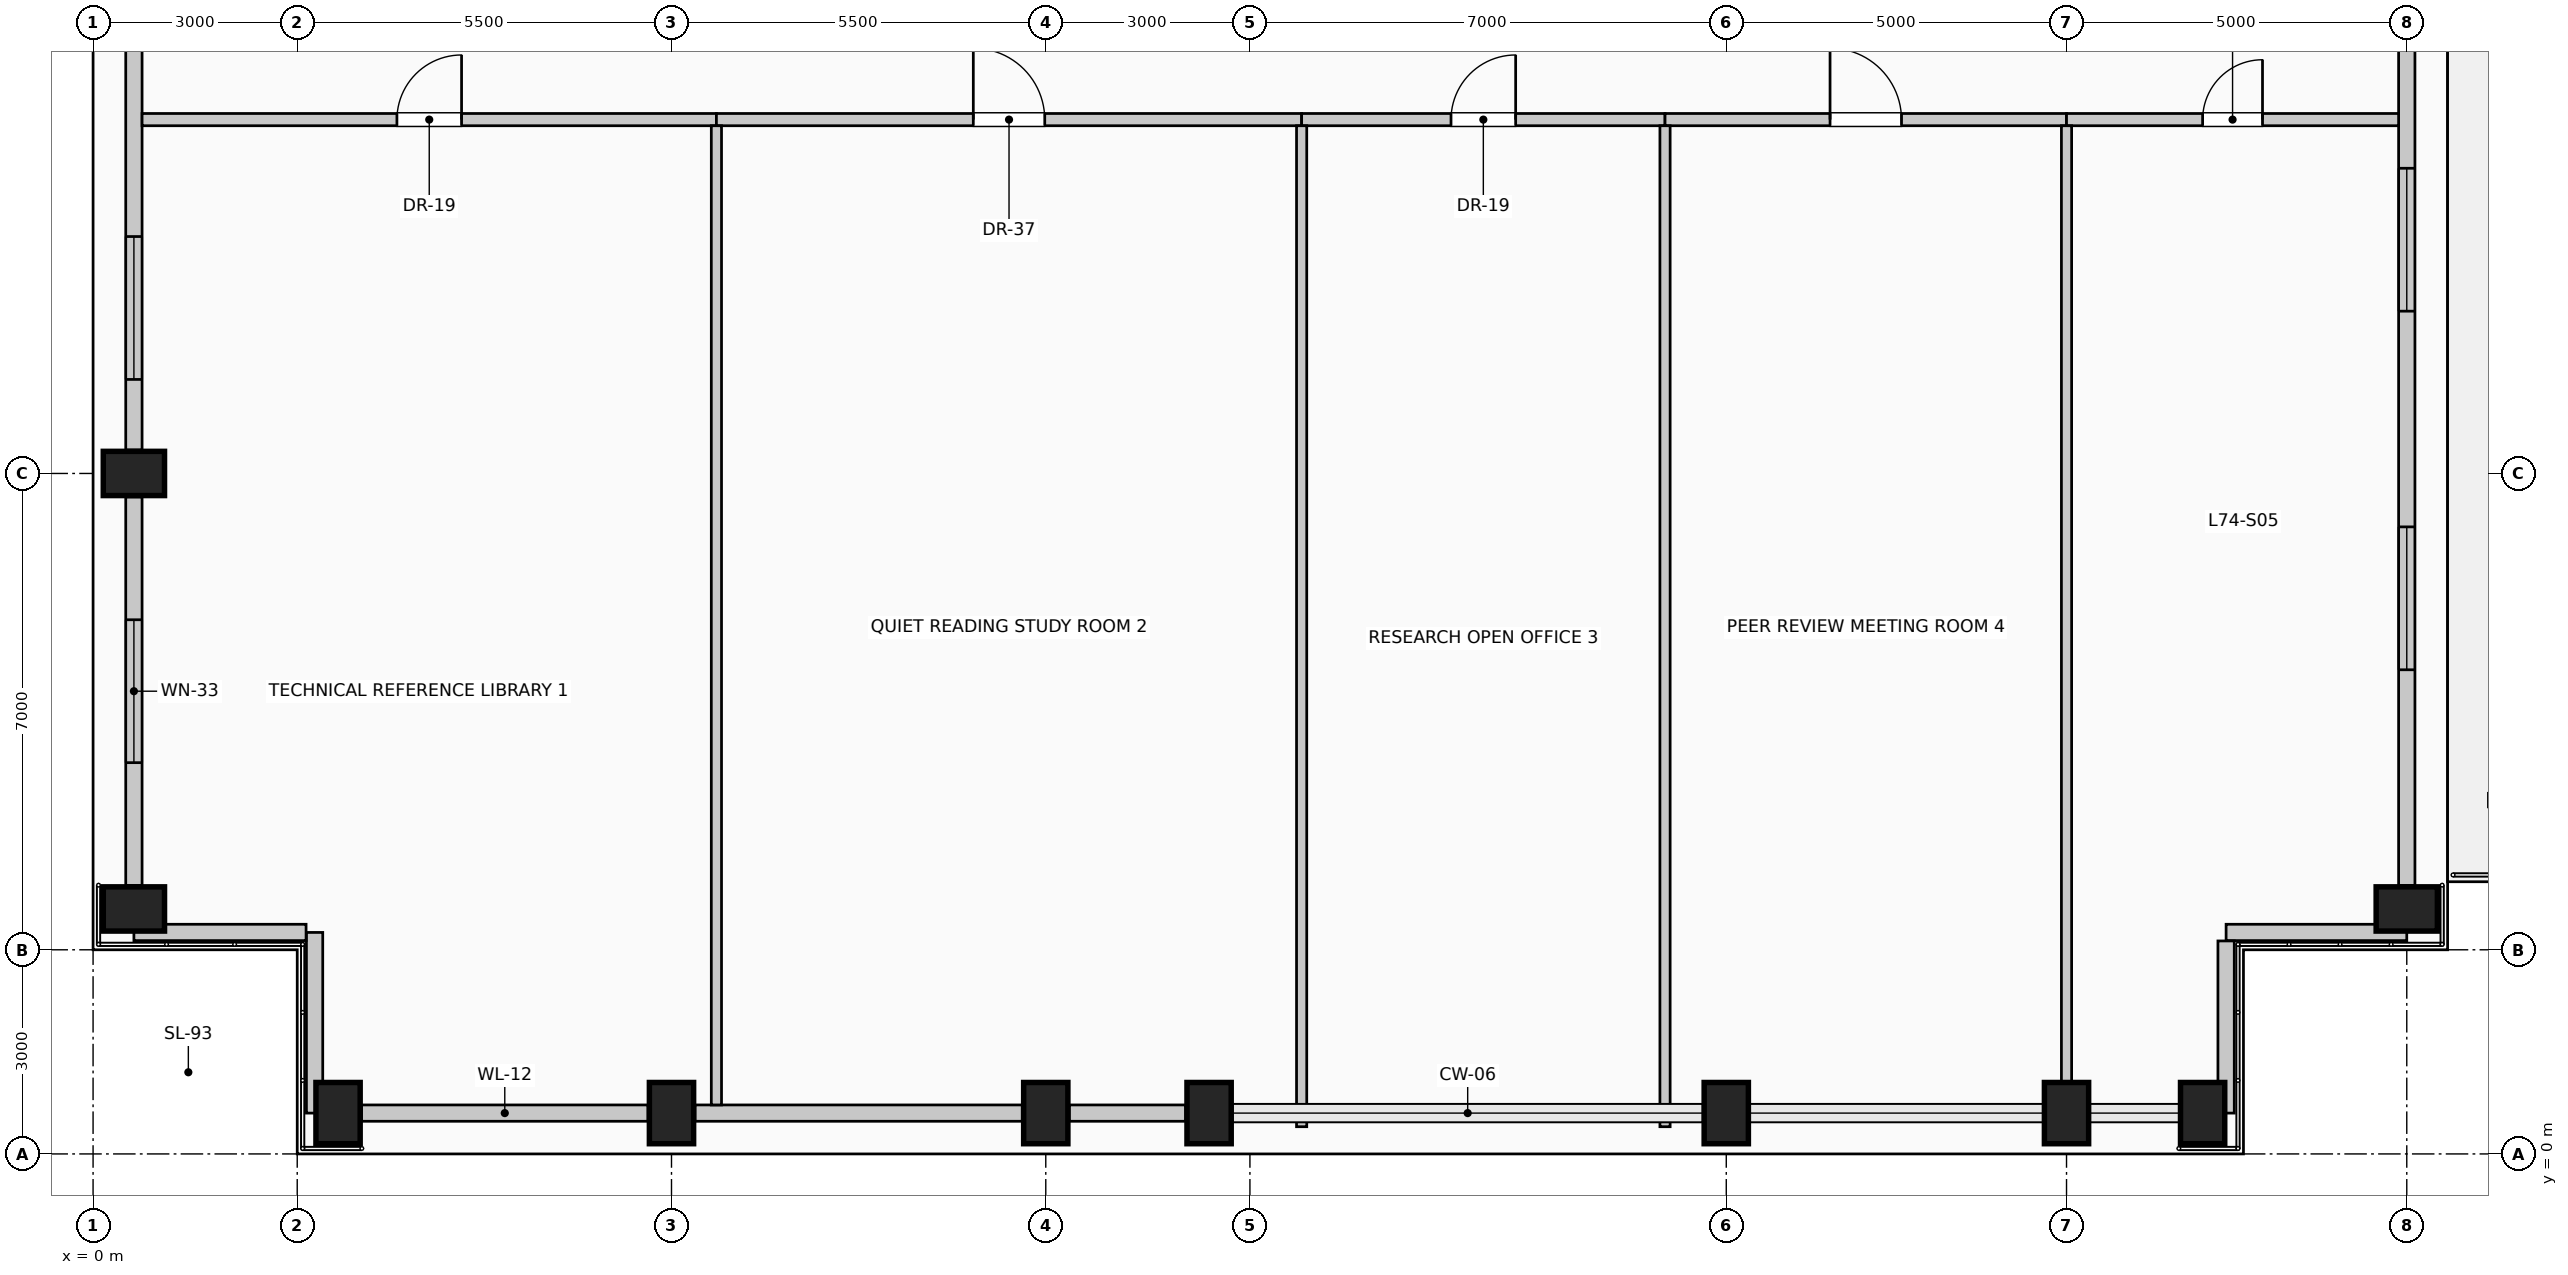
"""IFC4 building model, lengths in metres.
Left out: names, types, materials, properties, quantities, classifications, styles, units other than length and angle.
Written with IfcOpenShell. Run it as: python <this file> out.ifc"""

import sys

from ifc_helpers import new_model, si_unit, direction, frame, frame_2d, origin, origin_2d, place, context, subcontext, project, spatial, rectangle, extrude, element, fill, save


model = new_model("IFC4")
c1 = context("Model", 3, precision=1e-05, world=origin(), true_north=direction((0.0, 1.0)))
c2 = subcontext(c1, "Body", "Model", "MODEL_VIEW")
j1 = project(units=[si_unit("LENGTHUNIT", "METRE"), si_unit("PLANEANGLEUNIT", "RADIAN")], contexts=[c1])
p1 = place(None, origin())
s1 = spatial("IfcSite", under=j1, at=p1, CompositionType="ELEMENT")
p2 = place(p1, origin())
s2 = spatial("IfcBuilding", under=s1, at=p2, CompositionType="ELEMENT")
p3 = place(p2, frame((0.0, 0.0, 305.0)))
s3 = spatial("IfcBuildingStorey", under=s2, at=p3, CompositionType="ELEMENT", Elevation=305.0)
for number, where, z_axis, x_axis in (
    (1, (3.6, 0.6, 0.0), (0.0, 0.0, 1.0), (1.0, 0.0, 0.0)),
    (2, (8.5, 0.6, 0.0), (0.0, 0.0, 1.0), (1.0, 0.0, 0.0)),
    (3, (14.0, 0.6, 0.0), (0.0, 0.0, 1.0), (1.0, 0.0, 0.0)),
    (4, (16.4, 0.6, 0.0), (0.0, 0.0, 1.0), (1.0, 0.0, 0.0)),
    (5, (24.0, 0.6, 0.0), (0.0, 0.0, 1.0), (1.0, 0.0, 0.0)),
    (6, (29.0, 0.6, 0.0), (0.0, 0.0, 1.0), (1.0, 0.0, 0.0)),
    (7, (31.0, 0.6, 0.0), (0.0, 0.0, 1.0), (1.0, 0.0, 0.0)),
    (8, (0.6, 3.6, 0.0), (0.0, 0.0, 1.0), (0.0, 1.0, 0.0)),
    (9, (34.0, 3.6, 0.0), (0.0, 0.0, 1.0), (0.0, 1.0, 0.0)),
    (10, (0.6, 10.0, 0.0), (0.0, 0.0, 1.0), (0.0, 1.0, 0.0)),
):
    element("IfcColumn", number, at=place(p3, frame(where, z_axis=z_axis, x_axis=x_axis)), inside=s3, PredefinedType="COLUMN", context=c2, shape_type="SweptSolid", body=[
        extrude(rectangle(XDim=0.65, YDim=0.9, at=origin_2d()), origin(), (0.0, 0.0, 1.0), 4.0),
    ])
p4 = place(p3, frame((8.155, 0.6, 0.0), z_axis=(0.0, 0.0, 1.0), x_axis=(-1.0, 0.0, 0.0)))
e11 = element("IfcWall", 11, at=p4, inside=s3, PredefinedType="SOLIDWALL", context=c2, shape_type="SweptSolid", body=[
    extrude(rectangle(XDim=4.21, YDim=0.24, at=frame_2d((2.105, 0.0))), origin(), (0.0, 0.0, 1.0), 3.025),
])
p5 = place(p3, frame((13.655, 0.6, 0.0), z_axis=(0.0, 0.0, 1.0), x_axis=(-1.0, 0.0, 0.0)))
e12 = element("IfcWall", 12, at=p5, inside=s3, PredefinedType="SOLIDWALL", context=c2, shape_type="SweptSolid", body=[
    extrude(rectangle(XDim=4.81, YDim=0.24, at=frame_2d((2.405, 0.0))), origin(), (0.0, 0.0, 1.0), 3.025),
])
p6 = place(p3, frame((16.055, 0.6, 0.0), z_axis=(0.0, 0.0, 1.0), x_axis=(-1.0, 0.0, 0.0)))
e13 = element("IfcWall", 13, at=p6, inside=s3, PredefinedType="SOLIDWALL", context=c2, shape_type="SweptSolid", body=[
    extrude(rectangle(XDim=1.71, YDim=0.24, at=frame_2d((0.855, 0.0))), origin(), (0.0, 0.0, 1.0), 3.025),
])
p7 = place(p3, frame((0.6, 3.945, 0.0), z_axis=(0.0, 0.0, 1.0), x_axis=(0.0, 1.0, 0.0)))
e14 = element("IfcWall", 14, at=p7, inside=s3, PredefinedType="SOLIDWALL", context=c2, shape_type="SweptSolid", body=[
    extrude(rectangle(XDim=5.71, YDim=0.24, at=frame_2d((2.855, 0.0))), origin(), (0.0, 0.0, 1.0), 3.025),
])
p8 = place(p7, frame((1.805, 0.0, 0.35)))
e15 = element("IfcOpeningElement", 15, at=p8, cuts=e14, PredefinedType="OPENING", context=c2, shape_type="SweptSolid", body=[
    extrude(rectangle(XDim=2.1, YDim=2.2, at=frame_2d((1.05, 1.1))), frame((0.0, 0.13, 0.0), z_axis=(0.0, -1.0, 0.0), x_axis=(1.0, 0.0, 0.0)), (0.0, 0.0, 1.0), 0.26),
])
p9 = place(p3, frame((0.6, 10.345, 0.0), z_axis=(0.0, 0.0, 1.0), x_axis=(0.0, 1.0, 0.0)))
e16 = element("IfcWall", 16, at=p9, inside=s3, PredefinedType="SOLIDWALL", context=c2, shape_type="SweptSolid", body=[
    extrude(rectangle(XDim=7.31, YDim=0.24, at=frame_2d((3.655, 0.0))), origin(), (0.0, 0.0, 1.0), 3.025),
])
p10 = place(p9, frame((1.037, 0.0, 0.35)))
e17 = element("IfcOpeningElement", 17, at=p10, cuts=e16, PredefinedType="OPENING", context=c2, shape_type="SweptSolid", body=[
    extrude(rectangle(XDim=2.1, YDim=2.2, at=frame_2d((1.05, 1.1))), frame((0.0, 0.13, 0.0), z_axis=(0.0, -1.0, 0.0), x_axis=(1.0, 0.0, 0.0)), (0.0, 0.0, 1.0), 0.26),
])
p11 = place(p3, frame((34.0, 17.655, 0.0), z_axis=(0.0, 0.0, 1.0), x_axis=(0.0, -1.0, 0.0)))
e18 = element("IfcWall", 18, at=p11, inside=s3, PredefinedType="SOLIDWALL", context=c2, shape_type="SweptSolid", body=[
    extrude(rectangle(XDim=13.71, YDim=0.24, at=frame_2d((6.855, 0.0))), origin(), (0.0, 0.0, 1.0), 3.025),
])
p12 = place(p11, frame((3.17, 0.0, 0.35)))
e19 = element("IfcOpeningElement", 19, at=p12, cuts=e18, PredefinedType="OPENING", context=c2, shape_type="SweptSolid", body=[
    extrude(rectangle(XDim=2.1, YDim=2.2, at=frame_2d((1.05, 1.1))), frame((0.0, 0.13, 0.0), z_axis=(0.0, -1.0, 0.0), x_axis=(1.0, 0.0, 0.0)), (0.0, 0.0, 1.0), 0.26),
])
p13 = place(p11, frame((8.44, 0.0, 0.35)))
e20 = element("IfcOpeningElement", 20, at=p13, cuts=e18, PredefinedType="OPENING", context=c2, shape_type="SweptSolid", body=[
    extrude(rectangle(XDim=2.1, YDim=2.2, at=frame_2d((1.05, 1.1))), frame((0.0, 0.13, 0.0), z_axis=(0.0, -1.0, 0.0), x_axis=(1.0, 0.0, 0.0)), (0.0, 0.0, 1.0), 0.26),
])
p14 = place(p3, frame((34.0, 3.255, 0.0), z_axis=(0.0, 0.0, 1.0), x_axis=(-1.0, 0.0, 0.0)))
e21 = element("IfcWall", 21, at=p14, inside=s3, PredefinedType="SOLIDWALL", context=c2, shape_type="SweptSolid", body=[
    extrude(rectangle(XDim=2.655, YDim=0.24, at=frame_2d((1.328, 0.0))), origin(), (0.0, 0.0, 1.0), 3.775),
])
p15 = place(p3, frame((31.345, 3.13, 0.0), z_axis=(0.0, 0.0, 1.0), x_axis=(0.0, -1.0, 0.0)))
e22 = element("IfcWall", 22, at=p15, inside=s3, PredefinedType="SOLIDWALL", context=c2, shape_type="SweptSolid", body=[
    extrude(rectangle(XDim=2.53, YDim=0.24, at=frame_2d((1.265, 0.0))), origin(), (0.0, 0.0, 1.0), 3.775),
])
p16 = place(p3, frame((3.255, 0.6, 0.0), z_axis=(0.0, 0.0, 1.0), x_axis=(0.0, 1.0, 0.0)))
e23 = element("IfcWall", 23, at=p16, inside=s3, PredefinedType="SOLIDWALL", context=c2, shape_type="SweptSolid", body=[
    extrude(rectangle(XDim=2.655, YDim=0.24, at=frame_2d((1.327, 0.0))), origin(), (0.0, 0.0, 1.0), 3.775),
])
p17 = place(p3, frame((3.13, 3.255, 0.0), z_axis=(0.0, 0.0, 1.0), x_axis=(-1.0, 0.0, 0.0)))
e24 = element("IfcWall", 24, at=p17, inside=s3, PredefinedType="SOLIDWALL", context=c2, shape_type="SweptSolid", body=[
    extrude(rectangle(XDim=2.53, YDim=0.24, at=frame_2d((1.265, 0.0))), origin(), (0.0, 0.0, 1.0), 3.775),
])
p18 = place(p3, frame((0.72, 15.2, 0.0), z_axis=(0.0, 0.0, 1.0), x_axis=(1.0, 0.0, 0.0)))
e25 = element("IfcWall", 25, at=p18, inside=s3, PredefinedType="PARTITIONING", context=c2, shape_type="SweptSolid", body=[
    extrude(rectangle(XDim=8.44, YDim=0.18, at=frame_2d((4.22, 0.0))), origin(), (0.0, 0.0, 1.0), 3.775),
])
p19 = place(p18, frame((3.745, 0.0, 0.0)))
e26 = element("IfcOpeningElement", 26, at=p19, cuts=e25, PredefinedType="OPENING", context=c2, shape_type="SweptSolid", body=[
    extrude(rectangle(XDim=0.95, YDim=2.15, at=frame_2d((0.475, 1.075))), frame((0.0, 0.1, 0.0), z_axis=(0.0, -1.0, 0.0), x_axis=(1.0, 0.0, 0.0)), (0.0, 0.0, 1.0), 0.2),
])
p20 = place(p3, frame((9.16, 15.2, 0.0), z_axis=(0.0, 0.0, 1.0), x_axis=(1.0, 0.0, 0.0)))
e27 = element("IfcWall", 27, at=p20, inside=s3, PredefinedType="PARTITIONING", context=c2, shape_type="SweptSolid", body=[
    extrude(rectangle(XDim=8.6, YDim=0.18, at=frame_2d((4.3, 0.0))), origin(), (0.0, 0.0, 1.0), 3.775),
])
p21 = place(p20, frame((3.775, 0.0, 0.0)))
e28 = element("IfcOpeningElement", 28, at=p21, cuts=e27, PredefinedType="OPENING", context=c2, shape_type="SweptSolid", body=[
    extrude(rectangle(XDim=1.05, YDim=2.15, at=frame_2d((0.525, 1.075))), frame((0.0, 0.1, 0.0), z_axis=(0.0, -1.0, 0.0), x_axis=(1.0, 0.0, 0.0)), (0.0, 0.0, 1.0), 0.2),
])
p22 = place(p3, frame((17.76, 15.2, 0.0), z_axis=(0.0, 0.0, 1.0), x_axis=(1.0, 0.0, 0.0)))
e29 = element("IfcWall", 29, at=p22, inside=s3, PredefinedType="PARTITIONING", context=c2, shape_type="SweptSolid", body=[
    extrude(rectangle(XDim=5.34, YDim=0.18, at=frame_2d((2.67, 0.0))), origin(), (0.0, 0.0, 1.0), 3.775),
])
p23 = place(p22, frame((2.195, 0.0, 0.0)))
e30 = element("IfcOpeningElement", 30, at=p23, cuts=e29, PredefinedType="OPENING", context=c2, shape_type="SweptSolid", body=[
    extrude(rectangle(XDim=0.95, YDim=2.15, at=frame_2d((0.475, 1.075))), frame((0.0, 0.1, 0.0), z_axis=(0.0, -1.0, 0.0), x_axis=(1.0, 0.0, 0.0)), (0.0, 0.0, 1.0), 0.2),
])
p24 = place(p3, frame((23.1, 15.2, 0.0), z_axis=(0.0, 0.0, 1.0), x_axis=(1.0, 0.0, 0.0)))
e31 = element("IfcWall", 31, at=p24, inside=s3, PredefinedType="PARTITIONING", context=c2, shape_type="SweptSolid", body=[
    extrude(rectangle(XDim=5.9, YDim=0.18, at=frame_2d((2.95, 0.0))), origin(), (0.0, 0.0, 1.0), 3.775),
])
p25 = place(p24, frame((2.425, 0.0, 0.0)))
e32 = element("IfcOpeningElement", 32, at=p25, cuts=e31, PredefinedType="OPENING", context=c2, shape_type="SweptSolid", body=[
    extrude(rectangle(XDim=1.05, YDim=2.15, at=frame_2d((0.525, 1.075))), frame((0.0, 0.1, 0.0), z_axis=(0.0, -1.0, 0.0), x_axis=(1.0, 0.0, 0.0)), (0.0, 0.0, 1.0), 0.2),
])
p26 = place(p3, frame((29.0, 15.2, 0.0), z_axis=(0.0, 0.0, 1.0), x_axis=(1.0, 0.0, 0.0)))
e33 = element("IfcWall", 33, at=p26, inside=s3, PredefinedType="PARTITIONING", context=c2, shape_type="SweptSolid", body=[
    extrude(rectangle(XDim=4.88, YDim=0.18, at=frame_2d((2.44, 0.0))), origin(), (0.0, 0.0, 1.0), 3.775),
])
p27 = place(p26, frame((2.0, 0.0, 0.0)))
e34 = element("IfcOpeningElement", 34, at=p27, cuts=e33, PredefinedType="OPENING", context=c2, shape_type="SweptSolid", body=[
    extrude(rectangle(XDim=0.88, YDim=2.1, at=frame_2d((0.44, 1.05))), frame((0.0, 0.1, 0.0), z_axis=(0.0, -1.0, 0.0), x_axis=(1.0, 0.0, 0.0)), (0.0, 0.0, 1.0), 0.2),
])
p28 = place(p3, frame((9.16, 0.72, 0.0), z_axis=(0.0, 0.0, 1.0), x_axis=(0.0, 1.0, 0.0)))
e35 = element("IfcWall", 35, at=p28, inside=s3, PredefinedType="PARTITIONING", context=c2, shape_type="SweptSolid", body=[
    extrude(rectangle(XDim=14.39, YDim=0.15, at=frame_2d((7.195, 0.0))), origin(), (0.0, 0.0, 1.0), 3.775),
])
for number, where, z_axis, x_axis in (
    (36, (17.76, 0.4, 0.0), (0.0, 0.0, 1.0), (0.0, 1.0, 0.0)),
    (37, (23.1, 0.4, 0.0), (0.0, 0.0, 1.0), (0.0, 1.0, 0.0)),
):
    element("IfcWall", number, at=place(p3, frame(where, z_axis=z_axis, x_axis=x_axis)), inside=s3, PredefinedType="PARTITIONING", context=c2, shape_type="SweptSolid", body=[
        extrude(rectangle(XDim=14.71, YDim=0.15, at=frame_2d((7.355, 0.0))), origin(), (0.0, 0.0, 1.0), 3.775),
    ])
p29 = place(p3, frame((29.0, 1.05, 0.0), z_axis=(0.0, 0.0, 1.0), x_axis=(0.0, 1.0, 0.0)))
e38 = element("IfcWall", 38, at=p29, inside=s3, PredefinedType="PARTITIONING", context=c2, shape_type="SweptSolid", body=[
    extrude(rectangle(XDim=14.06, YDim=0.15, at=frame_2d((7.03, 0.0))), origin(), (0.0, 0.0, 1.0), 3.27),
])
p30 = place(p8, origin())
e39 = element("IfcWindow", 39, at=p30, inside=s3, PartitioningType="SINGLE_PANEL", PredefinedType="WINDOW", context=c2, shape_type="SweptSolid", body=[
    extrude(rectangle(XDim=2.1, YDim=2.2, at=frame_2d((1.05, 1.1))), frame((0.0, 0.03, 0.0), z_axis=(0.0, -1.0, 0.0), x_axis=(1.0, 0.0, 0.0)), (0.0, 0.0, 1.0), 0.06),
])
fill(e15, e39)
p31 = place(p10, origin())
e40 = element("IfcWindow", 40, at=p31, inside=s3, PartitioningType="SINGLE_PANEL", PredefinedType="WINDOW", context=c2, shape_type="SweptSolid", body=[
    extrude(rectangle(XDim=2.1, YDim=2.2, at=frame_2d((1.05, 1.1))), frame((0.0, 0.03, 0.0), z_axis=(0.0, -1.0, 0.0), x_axis=(1.0, 0.0, 0.0)), (0.0, 0.0, 1.0), 0.06),
])
fill(e17, e40)
p32 = place(p12, origin())
e41 = element("IfcWindow", 41, at=p32, inside=s3, PartitioningType="SINGLE_PANEL", PredefinedType="WINDOW", context=c2, shape_type="SweptSolid", body=[
    extrude(rectangle(XDim=2.1, YDim=2.2, at=frame_2d((1.05, 1.1))), frame((0.0, 0.03, 0.0), z_axis=(0.0, -1.0, 0.0), x_axis=(1.0, 0.0, 0.0)), (0.0, 0.0, 1.0), 0.06),
])
fill(e19, e41)
p33 = place(p13, origin())
e42 = element("IfcWindow", 42, at=p33, inside=s3, PartitioningType="SINGLE_PANEL", PredefinedType="WINDOW", context=c2, shape_type="SweptSolid", body=[
    extrude(rectangle(XDim=2.1, YDim=2.2, at=frame_2d((1.05, 1.1))), frame((0.0, 0.03, 0.0), z_axis=(0.0, -1.0, 0.0), x_axis=(1.0, 0.0, 0.0)), (0.0, 0.0, 1.0), 0.06),
])
fill(e20, e42)
p34 = place(p19, origin())
e43 = element("IfcDoor", 43, at=p34, inside=s3, OperationType="SINGLE_SWING_RIGHT", PredefinedType="DOOR", context=c2, shape_type="SweptSolid", body=[
    extrude(rectangle(XDim=0.95, YDim=2.15, at=frame_2d((0.475, 1.075))), frame((0.0, 0.025, 0.0), z_axis=(0.0, -1.0, 0.0), x_axis=(1.0, 0.0, 0.0)), (0.0, 0.0, 1.0), 0.05),
])
fill(e26, e43)
p35 = place(p21, origin())
e44 = element("IfcDoor", 44, at=p35, inside=s3, OperationType="SINGLE_SWING_LEFT", PredefinedType="DOOR", context=c2, shape_type="SweptSolid", body=[
    extrude(rectangle(XDim=1.05, YDim=2.15, at=frame_2d((0.525, 1.075))), frame((0.0, 0.025, 0.0), z_axis=(0.0, -1.0, 0.0), x_axis=(1.0, 0.0, 0.0)), (0.0, 0.0, 1.0), 0.05),
])
fill(e28, e44)
p36 = place(p23, origin())
e45 = element("IfcDoor", 45, at=p36, inside=s3, OperationType="SINGLE_SWING_RIGHT", PredefinedType="DOOR", context=c2, shape_type="SweptSolid", body=[
    extrude(rectangle(XDim=0.95, YDim=2.15, at=frame_2d((0.475, 1.075))), frame((0.0, 0.025, 0.0), z_axis=(0.0, -1.0, 0.0), x_axis=(1.0, 0.0, 0.0)), (0.0, 0.0, 1.0), 0.05),
])
fill(e30, e45)
p37 = place(p25, origin())
e46 = element("IfcDoor", 46, at=p37, inside=s3, OperationType="SINGLE_SWING_LEFT", PredefinedType="DOOR", context=c2, shape_type="SweptSolid", body=[
    extrude(rectangle(XDim=1.05, YDim=2.15, at=frame_2d((0.525, 1.075))), frame((0.0, 0.025, 0.0), z_axis=(0.0, -1.0, 0.0), x_axis=(1.0, 0.0, 0.0)), (0.0, 0.0, 1.0), 0.05),
])
fill(e32, e46)
p38 = place(p27, origin())
e47 = element("IfcDoor", 47, at=p38, inside=s3, OperationType="SINGLE_SWING_RIGHT", PredefinedType="DOOR", context=c2, shape_type="SweptSolid", body=[
    extrude(rectangle(XDim=0.88, YDim=2.1, at=frame_2d((0.44, 1.05))), frame((0.0, 0.025, 0.0), z_axis=(0.0, -1.0, 0.0), x_axis=(1.0, 0.0, 0.0)), (0.0, 0.0, 1.0), 0.05),
])
fill(e34, e47)
save(model, sys.argv[1])
